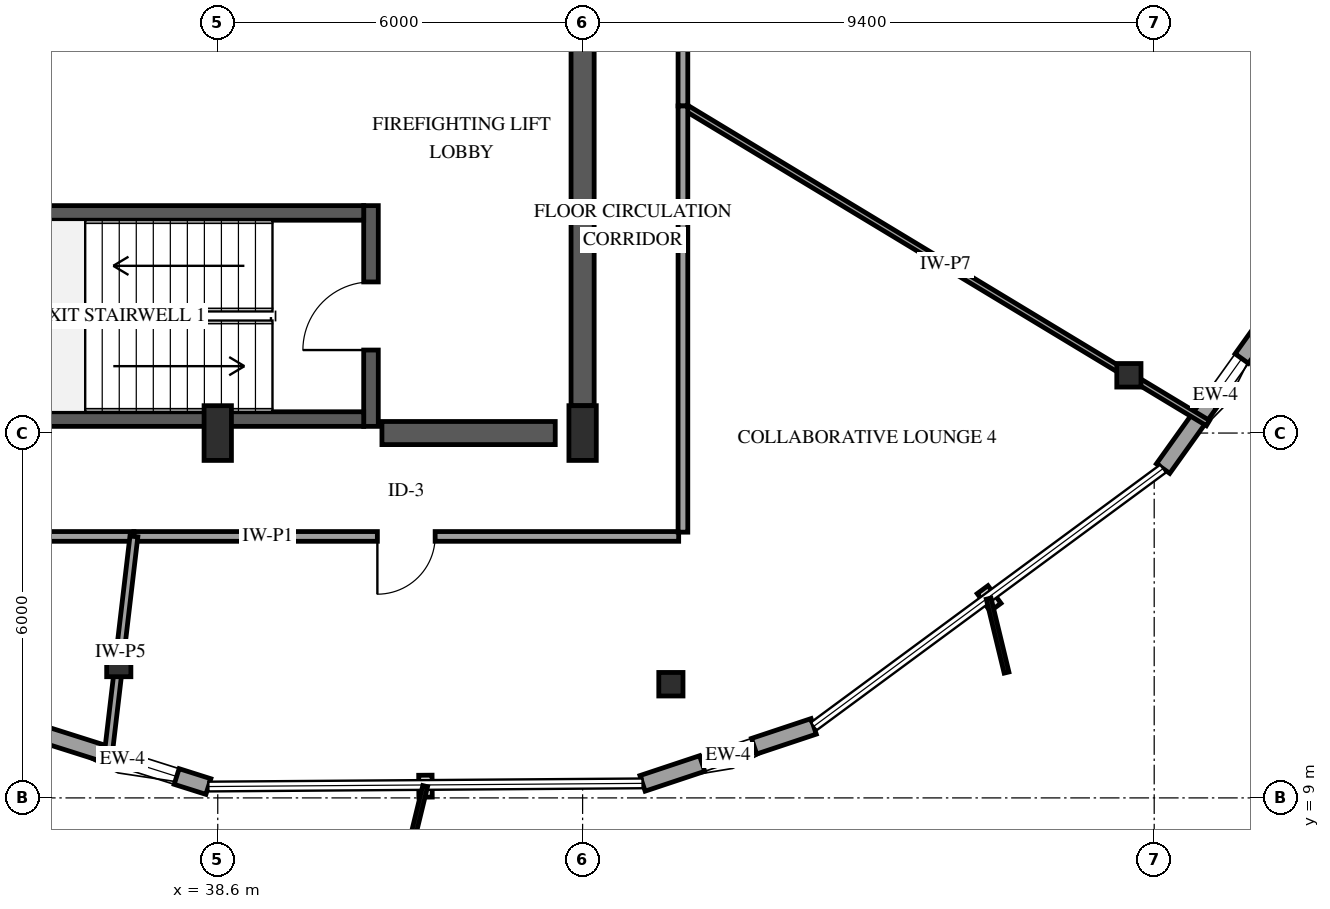
"""IFC4 building model, lengths in metres.
Left out: names, types, materials, properties, quantities, classifications, styles, units other than length and angle.
Written with IfcOpenShell. Run it as: python <this file> out.ifc"""

import sys

from ifc_helpers import new_model, si_unit, direction, frame, frame_2d, origin, origin_2d, place, context, subcontext, project, spatial, rectangle, i_section, extrude, element, fill, save


model = new_model("IFC4")
c1 = context("Model", 3, precision=1e-05, world=origin(), true_north=direction((0.0, 1.0)))
c2 = subcontext(c1, "Body", "Model", "MODEL_VIEW")
j1 = project(units=[si_unit("LENGTHUNIT", "METRE"), si_unit("PLANEANGLEUNIT", "RADIAN")], contexts=[c1])
p1 = place(None, origin())
s1 = spatial("IfcSite", under=j1, at=p1, CompositionType="ELEMENT")
p2 = place(p1, origin())
s2 = spatial("IfcBuilding", under=s1, at=p2, CompositionType="ELEMENT")
p3 = place(p2, frame((0.0, 0.0, 301.45)))
s3 = spatial("IfcBuildingStorey", under=s2, at=p3, CompositionType="ELEMENT", Elevation=301.45)
p4 = place(p3, frame((41.12, 15.11, 0.0), z_axis=(0.0, 0.0, 1.0), x_axis=(0.0, 1.0, 0.0)))
e1 = element("IfcWall", 1, at=p4, inside=s3, PredefinedType="SHEAR", context=c2, shape_type="SweptSolid", body=[
    extrude(rectangle(XDim=3.63, YDim=0.24, at=frame_2d((1.815, 0.0))), origin(), (0.0, 0.0, 1.0), 4.2),
])
p5 = place(p4, frame((1.255, 0.0, 0.0)))
e2 = element("IfcOpeningElement", 2, at=p5, cuts=e1, PredefinedType="OPENING", context=c2, shape_type="SweptSolid", body=[
    extrude(rectangle(XDim=1.12, YDim=2.15, at=frame_2d((0.56, 1.075))), frame((0.0, 0.13, 0.0), z_axis=(0.0, -1.0, 0.0), x_axis=(1.0, 0.0, 0.0)), (0.0, 0.0, 1.0), 0.26),
])
for number, where, z_axis, x_axis in (
    (3, (33.0, 15.23, 0.0), (0.0, 0.0, 1.0), (1.0, 0.0, 0.0)),
    (4, (33.0, 18.62, 0.0), (0.0, 0.0, 1.0), (1.0, 0.0, 0.0)),
):
    element("IfcWall", number, at=place(p3, frame(where, z_axis=z_axis, x_axis=x_axis)), inside=s3, PredefinedType="SHEAR", context=c2, shape_type="SweptSolid", body=[
        extrude(rectangle(XDim=8.0, YDim=0.24, at=frame_2d((4.0, 0.0))), origin(), (0.0, 0.0, 1.0), 4.2),
    ])
p6 = place(p3, frame((41.3, 15.0, 0.0), z_axis=(0.0, 0.0, 1.0), x_axis=(1.0, 0.0, 0.0)))
e5 = element("IfcWall", 5, at=p6, inside=s3, PredefinedType="SHEAR", context=c2, shape_type="SweptSolid", body=[
    extrude(rectangle(XDim=2.85, YDim=0.38, at=frame_2d((1.425, 0.0))), origin(), (0.0, 0.0, 1.0), 4.2),
])
p7 = place(p3, frame((44.6, 15.45, 0.0), z_axis=(0.0, 0.0, 1.0), x_axis=(0.0, 1.0, 0.0)))
e6 = element("IfcWall", 6, at=p7, inside=s3, PredefinedType="SHEAR", context=c2, shape_type="SweptSolid", body=[
    extrude(rectangle(XDim=6.35, YDim=0.38, at=frame_2d((3.175, 0.0))), origin(), (0.0, 0.0, 1.0), 4.2),
])
for number, where, z_axis, x_axis in (
    (7, (38.6, 15.0, 0.0), (0.0, 0.0, 1.0), (1.0, 0.0, 0.0)),
    (8, (44.6, 15.0, 0.0), (0.0, 0.0, 1.0), (1.0, 0.0, 0.0)),
):
    element("IfcColumn", number, at=place(p3, frame(where, z_axis=z_axis, x_axis=x_axis)), inside=s3, PredefinedType="PILASTER", context=c2, shape_type="SweptSolid", body=[
        extrude(rectangle(XDim=0.45, YDim=0.9, at=origin_2d()), origin(), (0.0, 0.0, 1.0), 4.2),
    ])
for number, where, z_axis, x_axis in (
    (9, (36.972, 11.187, 0.0), (0.0, 0.0, 1.0), (1.0, 0.0, 0.0)),
    (10, (46.052, 10.869, 0.0), (0.0, 0.0, 1.0), (1.0, 0.0, 0.0)),
    (11, (53.584, 15.95, 0.0), (0.0, 0.0, 1.0), (1.0, 0.0, 0.0)),
):
    element("IfcColumn", number, at=place(p3, frame(where, z_axis=z_axis, x_axis=x_axis)), inside=s3, PredefinedType="COLUMN", context=c2, shape_type="SweptSolid", body=[
        extrude(i_section(OverallWidth=0.398, OverallDepth=0.387, WebThickness=0.021, FlangeThickness=0.033, FilletRadius=0.038, at=origin_2d()), origin(), (0.0, 0.0, 1.0), 4.2),
    ])
p8 = place(p3, frame((35.618, 10.083, 0.0), z_axis=(0.0, 0.0, 1.0), x_axis=(0.953301162706, -0.302021345574, 0.0)))
e12 = element("IfcWall", 12, at=p8, inside=s3, PredefinedType="SOLIDWALL", context=c2, shape_type="SweptSolid", body=[
    extrude(rectangle(XDim=2.967, YDim=0.27, at=frame_2d((1.483, 0.0))), origin(), (0.0, 0.0, 1.0), 3.274),
])
p9 = place(p8, frame((1.519, 0.0, 0.75)))
e13 = element("IfcOpeningElement", 13, at=p9, cuts=e12, PredefinedType="OPENING", context=c2, shape_type="SweptSolid", body=[
    extrude(rectangle(XDim=0.9, YDim=1.5, at=frame_2d((0.45, 0.75))), frame((0.0, 0.145, 0.0), z_axis=(0.0, -1.0, 0.0), x_axis=(1.0, 0.0, 0.0)), (0.0, 0.0, 1.0), 0.29),
])
p10 = place(p3, frame((45.586, 9.239, 0.0), z_axis=(0.0, 0.0, 1.0), x_axis=(0.948757335835, 0.31600556593, 0.0)))
e14 = element("IfcWall", 14, at=p10, inside=s3, PredefinedType="SOLIDWALL", context=c2, shape_type="SweptSolid", body=[
    extrude(rectangle(XDim=2.967, YDim=0.27, at=frame_2d((1.483, 0.0))), origin(), (0.0, 0.0, 1.0), 3.274),
])
p11 = place(p10, frame((1.033, 0.0, 0.75)))
e15 = element("IfcOpeningElement", 15, at=p11, cuts=e14, PredefinedType="OPENING", context=c2, shape_type="SweptSolid", body=[
    extrude(rectangle(XDim=0.9, YDim=1.5, at=frame_2d((0.45, 0.75))), frame((0.0, 0.145, 0.0), z_axis=(0.0, -1.0, 0.0), x_axis=(1.0, 0.0, 0.0)), (0.0, 0.0, 1.0), 0.29),
])
p12 = place(p3, frame((54.146, 14.416, 0.0), z_axis=(0.0, 0.0, 1.0), x_axis=(0.581860834108, 0.813288368127, 0.0)))
e16 = element("IfcWall", 16, at=p12, inside=s3, PredefinedType="SOLIDWALL", context=c2, shape_type="SweptSolid", body=[
    extrude(rectangle(XDim=2.967, YDim=0.27, at=frame_2d((1.483, 0.0))), origin(), (0.0, 0.0, 1.0), 3.274),
])
p13 = place(p12, frame((1.325, 0.0, 0.75)))
e17 = element("IfcOpeningElement", 17, at=p13, cuts=e16, PredefinedType="OPENING", context=c2, shape_type="SweptSolid", body=[
    extrude(rectangle(XDim=0.9, YDim=1.5, at=frame_2d((0.45, 0.75))), frame((0.0, 0.145, 0.0), z_axis=(0.0, -1.0, 0.0), x_axis=(1.0, 0.0, 0.0)), (0.0, 0.0, 1.0), 0.29),
])
p14 = place(p3, frame((46.25, 20.379, 0.0), z_axis=(0.0, 0.0, 1.0), x_axis=(0.855983606602, -0.517002964429, 0.0)))
e18 = element("IfcWall", 18, at=p14, inside=s3, PredefinedType="PARTITIONING", context=c2, shape_type="SweptSolid", body=[
    extrude(rectangle(XDim=10.087, YDim=0.1, at=frame_2d((5.043, 0.0))), origin(), (0.0, 0.0, 1.0), 3.273),
])
p15 = place(p3, frame((46.18, 13.3, 0.0), z_axis=(0.0, 0.0, 1.0), x_axis=(-1.0, 0.0, 0.0)))
e19 = element("IfcWall", 19, at=p15, inside=s3, PredefinedType="PARTITIONING", context=c2, shape_type="SweptSolid", body=[
    extrude(rectangle(XDim=8.959, YDim=0.16, at=frame_2d((4.479, 0.0))), origin(), (0.0, 0.0, 1.0), 3.895),
])
p16 = place(p15, frame((4.005, 0.0, 0.0)))
e20 = element("IfcOpeningElement", 20, at=p16, cuts=e19, PredefinedType="OPENING", context=c2, shape_type="SweptSolid", body=[
    extrude(rectangle(XDim=0.95, YDim=2.15, at=frame_2d((0.475, 1.075))), frame((0.0, 0.09, 0.0), z_axis=(0.0, -1.0, 0.0), x_axis=(1.0, 0.0, 0.0)), (0.0, 0.0, 1.0), 0.18),
])
p17 = place(p3, frame((46.25, 29.035, 0.0), z_axis=(0.0, 0.0, 1.0), x_axis=(0.0, -1.0, 0.0)))
e21 = element("IfcWall", 21, at=p17, inside=s3, PredefinedType="PARTITIONING", context=c2, shape_type="SweptSolid", body=[
    extrude(rectangle(XDim=8.656, YDim=0.16, at=frame_2d((4.328, 0.0))), origin(), (0.0, 0.0, 1.0), 3.895),
])
p18 = place(p17, frame((3.853, 0.0, 0.0)))
e22 = element("IfcOpeningElement", 22, at=p18, cuts=e21, PredefinedType="OPENING", context=c2, shape_type="SweptSolid", body=[
    extrude(rectangle(XDim=0.95, YDim=2.15, at=frame_2d((0.475, 1.075))), frame((0.0, 0.09, 0.0), z_axis=(0.0, -1.0, 0.0), x_axis=(1.0, 0.0, 0.0)), (0.0, 0.0, 1.0), 0.18),
])
p19 = place(p3, frame((46.25, 20.379, 0.0), z_axis=(0.0, 0.0, 1.0), x_axis=(0.0, -1.0, 0.0)))
e23 = element("IfcWall", 23, at=p19, inside=s3, PredefinedType="PARTITIONING", context=c2, shape_type="SweptSolid", body=[
    extrude(rectangle(XDim=7.009, YDim=0.16, at=frame_2d((3.504, 0.0))), origin(), (0.0, 0.0, 1.0), 3.895),
])
p20 = place(p3, frame((37.221, 13.3, 0.0), z_axis=(0.0, 0.0, 1.0), x_axis=(-1.0, 0.0, 0.0)))
e24 = element("IfcWall", 24, at=p20, inside=s3, PredefinedType="PARTITIONING", context=c2, shape_type="SweptSolid", body=[
    extrude(rectangle(XDim=4.551, YDim=0.16, at=frame_2d((2.275, 0.0))), origin(), (0.0, 0.0, 1.0), 3.895),
])
p21 = place(p20, frame((1.8, 0.0, 0.0)))
e25 = element("IfcOpeningElement", 25, at=p21, cuts=e24, PredefinedType="OPENING", context=c2, shape_type="SweptSolid", body=[
    extrude(rectangle(XDim=0.95, YDim=2.15, at=frame_2d((0.475, 1.075))), frame((0.0, 0.09, 0.0), z_axis=(0.0, -1.0, 0.0), x_axis=(1.0, 0.0, 0.0)), (0.0, 0.0, 1.0), 0.18),
])
p22 = place(p3, frame((37.221, 13.3, 0.0), z_axis=(0.0, 0.0, 1.0), x_axis=(-0.116948716677, -0.993137955003, 0.0)))
e26 = element("IfcWall", 26, at=p22, inside=s3, PredefinedType="PARTITIONING", context=c2, shape_type="SweptSolid", body=[
    extrude(rectangle(XDim=3.822, YDim=0.13, at=frame_2d((1.911, 0.0))), origin(), (0.0, 0.0, 1.0), 3.895),
])
p23 = place(p9, origin())
e27 = element("IfcWindow", 27, at=p23, inside=s3, PartitioningType="SINGLE_PANEL", PredefinedType="WINDOW", context=c2, shape_type="SweptSolid", body=[
    extrude(rectangle(XDim=0.9, YDim=1.5, at=frame_2d((0.45, 0.75))), frame((0.0, 0.03, 0.0), z_axis=(0.0, -1.0, 0.0), x_axis=(1.0, 0.0, 0.0)), (0.0, 0.0, 1.0), 0.06),
])
fill(e13, e27)
p24 = place(p11, origin())
e28 = element("IfcWindow", 28, at=p24, inside=s3, PartitioningType="SINGLE_PANEL", PredefinedType="WINDOW", context=c2, shape_type="SweptSolid", body=[
    extrude(rectangle(XDim=0.9, YDim=1.5, at=frame_2d((0.45, 0.75))), frame((0.0, 0.03, 0.0), z_axis=(0.0, -1.0, 0.0), x_axis=(1.0, 0.0, 0.0)), (0.0, 0.0, 1.0), 0.06),
])
fill(e15, e28)
p25 = place(p13, origin())
e29 = element("IfcWindow", 29, at=p25, inside=s3, PartitioningType="SINGLE_PANEL", PredefinedType="WINDOW", context=c2, shape_type="SweptSolid", body=[
    extrude(rectangle(XDim=0.9, YDim=1.5, at=frame_2d((0.45, 0.75))), frame((0.0, 0.03, 0.0), z_axis=(0.0, -1.0, 0.0), x_axis=(1.0, 0.0, 0.0)), (0.0, 0.0, 1.0), 0.06),
])
fill(e17, e29)
p26 = place(p5, origin())
e30 = element("IfcDoor", 30, at=p26, inside=s3, OperationType="SINGLE_SWING_LEFT", PredefinedType="DOOR", context=c2, shape_type="SweptSolid", body=[
    extrude(rectangle(XDim=1.12, YDim=2.15, at=frame_2d((0.56, 1.075))), frame((0.0, 0.025, 0.0), z_axis=(0.0, -1.0, 0.0), x_axis=(1.0, 0.0, 0.0)), (0.0, 0.0, 1.0), 0.05),
])
fill(e2, e30)
p27 = place(p16, origin())
e31 = element("IfcDoor", 31, at=p27, inside=s3, OperationType="SINGLE_SWING_RIGHT", PredefinedType="DOOR", context=c2, shape_type="SweptSolid", body=[
    extrude(rectangle(XDim=0.95, YDim=2.15, at=frame_2d((0.475, 1.075))), frame((0.0, 0.025, 0.0), z_axis=(0.0, -1.0, 0.0), x_axis=(1.0, 0.0, 0.0)), (0.0, 0.0, 1.0), 0.05),
])
fill(e20, e31)
save(model, sys.argv[1])
